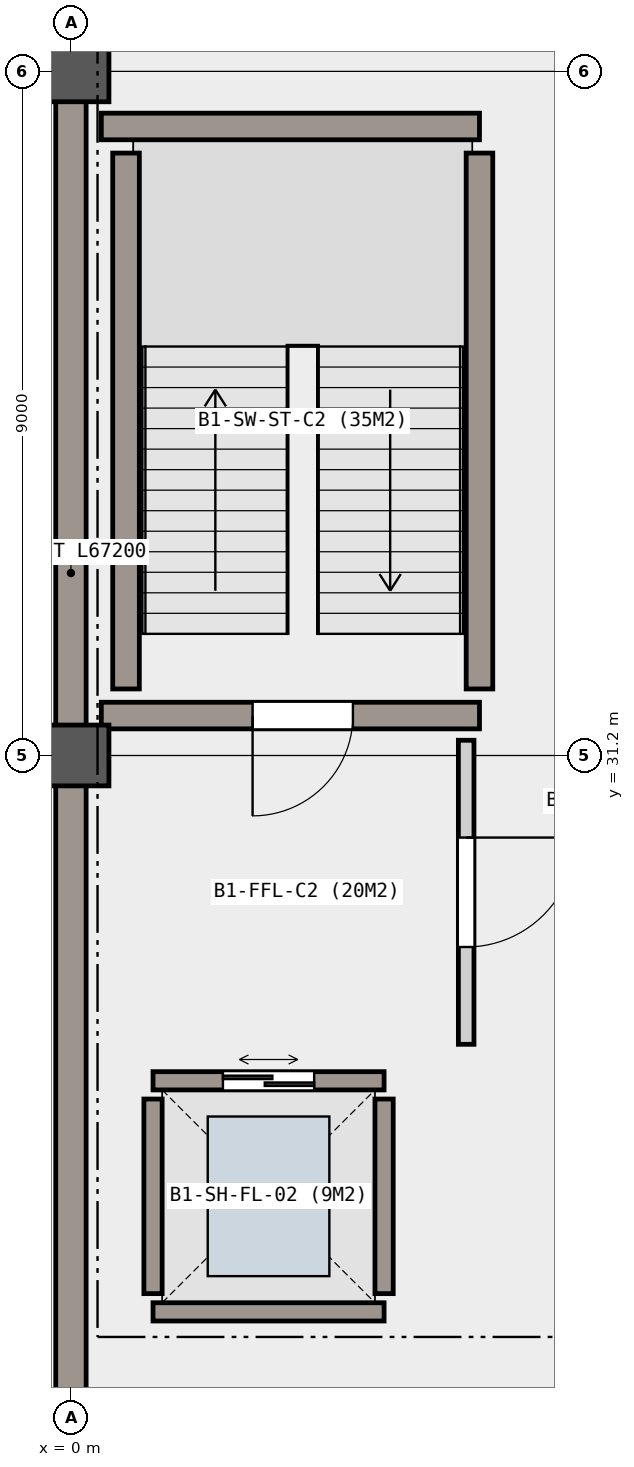
"""IFC4 building model, lengths in metres.
Left out: names, types, materials, properties, quantities, classifications, styles, units other than length and angle.
Written with IfcOpenShell. Run it as: python <this file> out.ifc"""

import sys

from ifc_helpers import new_model, si_unit, direction, frame, frame_2d, origin, origin_2d, place, context, subcontext, project, spatial, rectangle, extrude, element, fill, save


model = new_model("IFC4")
c1 = context("Model", 3, precision=1e-05, world=origin(), true_north=direction((0.0, 1.0)))
c2 = subcontext(c1, "Body", "Model", "MODEL_VIEW")
j1 = project(units=[si_unit("LENGTHUNIT", "METRE"), si_unit("PLANEANGLEUNIT", "RADIAN")], contexts=[c1])
p1 = place(None, origin())
s1 = spatial("IfcSite", under=j1, at=p1, CompositionType="ELEMENT")
p2 = place(p1, origin())
s2 = spatial("IfcBuilding", under=s1, at=p2, CompositionType="ELEMENT")
p3 = place(p2, frame((0.0, 0.0, -4.8)))
s3 = spatial("IfcBuildingStorey", under=s2, at=p3, CompositionType="ELEMENT", Elevation=-4.8)
for number, where, z_axis, x_axis in (
    (1, (0.0, 31.2, 0.0), (0.0, 0.0, 1.0), (1.0, 0.0, 0.0)),
    (2, (0.0, 40.2, 0.0), (0.0, 0.0, 1.0), (1.0, 0.0, 0.0)),
):
    element("IfcColumn", number, at=place(p3, frame(where, z_axis=z_axis, x_axis=x_axis)), inside=s3, PredefinedType="COLUMN", context=c2, shape_type="SweptSolid", body=[
        extrude(rectangle(XDim=1.0, YDim=0.8, at=origin_2d()), origin(), (0.0, 0.0, 1.0), 4.8),
    ])
p4 = place(p3, frame((0.0, 0.0, 0.0), z_axis=(0.0, 0.0, 1.0), x_axis=(0.0, 1.0, 0.0)))
e3 = element("IfcWall", 3, at=p4, inside=s3, PredefinedType="USERDEFINED", context=c2, shape_type="SweptSolid", body=[
    extrude(rectangle(XDim=67.2, YDim=0.4, at=frame_2d((33.6, 0.0))), origin(), (0.0, 0.0, 1.0), 3.88),
])
p5 = place(p3, frame((4.12, 23.88, 0.0), z_axis=(0.0, 0.0, 1.0), x_axis=(-1.0, 0.0, 0.0)))
e4 = element("IfcWall", 4, at=p5, inside=s3, PredefinedType="SHEAR", context=c2, shape_type="SweptSolid", body=[
    extrude(rectangle(XDim=3.04, YDim=0.24, at=frame_2d((1.52, 0.0))), origin(), (0.0, 0.0, 1.0), 4.48),
])
p6 = place(p3, frame((1.08, 26.92, 0.0), z_axis=(0.0, 0.0, 1.0), x_axis=(1.0, 0.0, 0.0)))
e5 = element("IfcWall", 5, at=p6, inside=s3, PredefinedType="SHEAR", context=c2, shape_type="SweptSolid", body=[
    extrude(rectangle(XDim=3.04, YDim=0.24, at=frame_2d((1.52, 0.0))), origin(), (0.0, 0.0, 1.0), 4.48),
])
p7 = place(p6, frame((0.92, 0.0, 0.0)))
e6 = element("IfcOpeningElement", 6, at=p7, cuts=e5, PredefinedType="OPENING", context=c2, shape_type="SweptSolid", body=[
    extrude(rectangle(XDim=1.2, YDim=2.15, at=frame_2d((0.6, 1.075))), frame((0.0, 0.13, 0.0), z_axis=(0.0, -1.0, 0.0), x_axis=(1.0, 0.0, 0.0)), (0.0, 0.0, 1.0), 0.26),
])
for number, where, z_axis, x_axis in (
    (7, (1.08, 24.12, 0.0), (0.0, 0.0, 1.0), (0.0, 1.0, 0.0)),
    (8, (4.12, 26.68, 0.0), (0.0, 0.0, 1.0), (0.0, -1.0, 0.0)),
):
    element("IfcWall", number, at=place(p3, frame(where, z_axis=z_axis, x_axis=x_axis)), inside=s3, PredefinedType="SHEAR", context=c2, shape_type="SweptSolid", body=[
        extrude(rectangle(XDim=2.56, YDim=0.24, at=frame_2d((1.28, 0.0))), origin(), (0.0, 0.0, 1.0), 4.48),
    ])
p8 = place(p3, frame((5.375, 31.725, 0.0), z_axis=(0.0, 0.0, 1.0), x_axis=(-1.0, 0.0, 0.0)))
e9 = element("IfcWall", 9, at=p8, inside=s3, PredefinedType="SHEAR", context=c2, shape_type="SweptSolid", body=[
    extrude(rectangle(XDim=4.975, YDim=0.35, at=frame_2d((2.488, 0.0))), origin(), (0.0, 0.0, 1.0), 4.48),
])
p9 = place(p8, frame((1.665, 0.0, 0.0)))
e10 = element("IfcOpeningElement", 10, at=p9, cuts=e9, PredefinedType="OPENING", context=c2, shape_type="SweptSolid", body=[
    extrude(rectangle(XDim=1.32, YDim=2.15, at=frame_2d((0.66, 1.075))), frame((0.0, 0.185, 0.0), z_axis=(0.0, -1.0, 0.0), x_axis=(1.0, 0.0, 0.0)), (0.0, 0.0, 1.0), 0.37),
])
p10 = place(p3, frame((0.4, 39.475, 0.0), z_axis=(0.0, 0.0, 1.0), x_axis=(1.0, 0.0, 0.0)))
e11 = element("IfcWall", 11, at=p10, inside=s3, PredefinedType="SHEAR", context=c2, shape_type="SweptSolid", body=[
    extrude(rectangle(XDim=4.975, YDim=0.35, at=frame_2d((2.488, 0.0))), origin(), (0.0, 0.0, 1.0), 4.48),
])
for number, where, z_axis, x_axis in (
    (12, (0.725, 32.075, 0.0), (0.0, 0.0, 1.0), (0.0, 1.0, 0.0)),
    (13, (5.375, 39.125, 0.0), (0.0, 0.0, 1.0), (0.0, -1.0, 0.0)),
):
    element("IfcWall", number, at=place(p3, frame(where, z_axis=z_axis, x_axis=x_axis)), inside=s3, PredefinedType="SHEAR", context=c2, shape_type="SweptSolid", body=[
        extrude(rectangle(XDim=7.05, YDim=0.35, at=frame_2d((3.525, 0.0))), origin(), (0.0, 0.0, 1.0), 4.48),
    ])
p11 = place(p3, frame((5.2, 31.4, 0.0), z_axis=(0.0, 0.0, 1.0), x_axis=(0.0, -1.0, 0.0)))
e14 = element("IfcWall", 14, at=p11, inside=s3, PredefinedType="PARTITIONING", context=c2, shape_type="SweptSolid", body=[
    extrude(rectangle(XDim=4.0, YDim=0.205, at=frame_2d((2.0, 0.0))), origin(), (0.0, 0.0, 1.0), 4.48),
])
p12 = place(p11, frame((1.28, 0.0, 0.0)))
e15 = element("IfcOpeningElement", 15, at=p12, cuts=e14, PredefinedType="OPENING", context=c2, shape_type="SweptSolid", body=[
    extrude(rectangle(XDim=1.44, YDim=2.18, at=frame_2d((0.72, 1.09))), frame((0.0, 0.113, 0.0), z_axis=(0.0, -1.0, 0.0), x_axis=(1.0, 0.0, 0.0)), (0.0, 0.0, 1.0), 0.225),
])
p13 = place(p7, origin())
e16 = element("IfcDoor", 16, at=p13, inside=s3, OperationType="DOUBLE_DOOR_SLIDING", PredefinedType="DOOR", context=c2, shape_type="SweptSolid", body=[
    extrude(rectangle(XDim=1.2, YDim=2.15, at=frame_2d((0.6, 1.075))), frame((0.0, 0.025, 0.0), z_axis=(0.0, -1.0, 0.0), x_axis=(1.0, 0.0, 0.0)), (0.0, 0.0, 1.0), 0.05),
])
fill(e6, e16)
p14 = place(p9, origin())
e17 = element("IfcDoor", 17, at=p14, inside=s3, OperationType="SINGLE_SWING_RIGHT", PredefinedType="DOOR", context=c2, shape_type="SweptSolid", body=[
    extrude(rectangle(XDim=1.32, YDim=2.15, at=frame_2d((0.66, 1.075))), frame((0.0, 0.025, 0.0), z_axis=(0.0, -1.0, 0.0), x_axis=(1.0, 0.0, 0.0)), (0.0, 0.0, 1.0), 0.05),
])
fill(e10, e17)
p15 = place(p12, origin())
e18 = element("IfcDoor", 18, at=p15, inside=s3, OperationType="SINGLE_SWING_LEFT", PredefinedType="DOOR", context=c2, shape_type="SweptSolid", body=[
    extrude(rectangle(XDim=1.44, YDim=2.18, at=frame_2d((0.72, 1.09))), frame((0.0, 0.025, 0.0), z_axis=(0.0, -1.0, 0.0), x_axis=(1.0, 0.0, 0.0)), (0.0, 0.0, 1.0), 0.05),
])
fill(e15, e18)
save(model, sys.argv[1])
